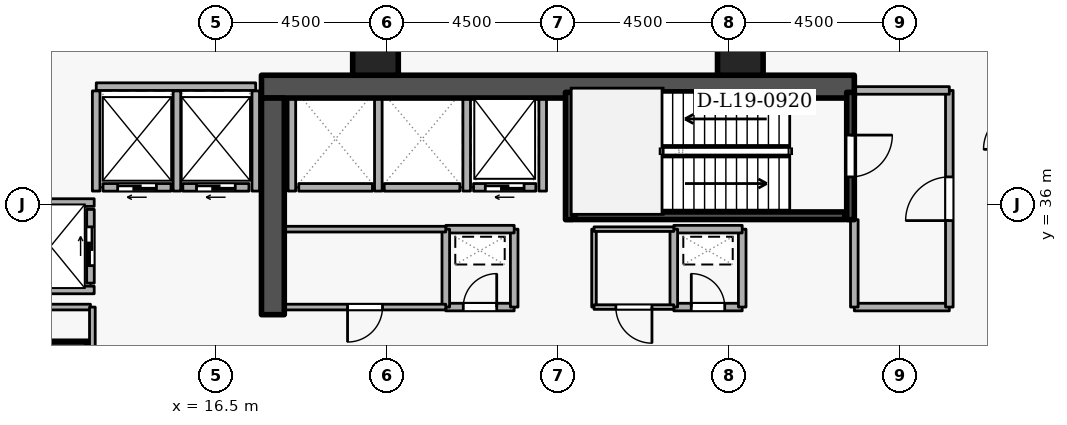
"""IFC4 building model, lengths in metres.
Left out: names, types, materials, properties, quantities, classifications, styles, units other than length and angle.
Written with IfcOpenShell. Run it as: python <this file> out.ifc"""

import sys

from ifc_helpers import new_model, si_unit, direction, frame, frame_2d, origin, origin_2d, place, context, subcontext, project, spatial, rectangle, extrude, element, fill, save


model = new_model("IFC4")
c1 = context("Model", 3, precision=1e-05, world=origin(), true_north=direction((0.0, 1.0)))
c2 = subcontext(c1, "Body", "Model", "MODEL_VIEW")
j1 = project(units=[si_unit("LENGTHUNIT", "METRE"), si_unit("PLANEANGLEUNIT", "RADIAN")], contexts=[c1])
p1 = place(None, origin())
s1 = spatial("IfcSite", under=j1, at=p1, CompositionType="ELEMENT")
p2 = place(p1, origin())
s2 = spatial("IfcBuilding", under=s1, at=p2, CompositionType="ELEMENT")
p3 = place(p2, frame((0.0, 0.0, 75.9)))
s3 = spatial("IfcBuildingStorey", under=s2, at=p3, CompositionType="ELEMENT", Elevation=75.9)
p4 = place(p3, frame((17.7, 39.1, 0.0), z_axis=(0.0, 0.0, 1.0), x_axis=(1.0, 0.0, 0.0)))
e1 = element("IfcWall", 1, at=p4, inside=s3, PredefinedType="SHEAR", context=c2, shape_type="SweptSolid", body=[
    extrude(rectangle(XDim=15.6, YDim=0.6, at=frame_2d((7.8, 0.0))), origin(), (0.0, 0.0, 1.0), 4.2),
])
p5 = place(p3, frame((18.0, 33.1, 0.0), z_axis=(0.0, 0.0, 1.0), x_axis=(0.0, 1.0, 0.0)))
e2 = element("IfcWall", 2, at=p5, inside=s3, PredefinedType="SHEAR", context=c2, shape_type="SweptSolid", body=[
    extrude(rectangle(XDim=5.7, YDim=0.6, at=frame_2d((2.85, 0.0))), origin(), (0.0, 0.0, 1.0), 4.2),
])
for number, where, z_axis, x_axis in (
    (3, (12.5, 31.8, 0.0), (0.0, 0.0, 1.0), (1.0, 0.0, 0.0)),
    (4, (20.7, 40.0, 0.0), (0.0, 0.0, 1.0), (1.0, 0.0, 0.0)),
    (5, (30.3, 40.0, 0.0), (0.0, 0.0, 1.0), (1.0, 0.0, 0.0)),
):
    element("IfcColumn", number, at=place(p3, frame(where, z_axis=z_axis, x_axis=x_axis)), inside=s3, PredefinedType="COLUMN", context=c2, shape_type="SweptSolid", body=[
        extrude(rectangle(XDim=1.2, YDim=1.2, at=origin_2d()), origin(), (0.0, 0.0, 1.0), 4.2),
    ])
p6 = place(p3, frame((24.92, 36.45, 0.0), z_axis=(0.0, 0.0, 1.0), x_axis=(-1.0, 0.0, 0.0)))
e6 = element("IfcWall", 6, at=p6, inside=s3, PredefinedType="STANDARD", context=c2, shape_type="SweptSolid", body=[
    extrude(rectangle(XDim=1.64, YDim=0.2, at=frame_2d((0.82, 0.0))), origin(), (0.0, 0.0, 1.0), 3.94),
])
p7 = place(p6, frame((0.31, 0.0, 0.0)))
e7 = element("IfcOpeningElement", 7, at=p7, cuts=e6, PredefinedType="OPENING", context=c2, shape_type="SweptSolid", body=[
    extrude(rectangle(XDim=1.02, YDim=2.06, at=frame_2d((0.51, 1.03))), frame((0.0, 0.11, 0.0), z_axis=(0.0, -1.0, 0.0), x_axis=(1.0, 0.0, 0.0)), (0.0, 0.0, 1.0), 0.22),
])
p8 = place(p3, frame((22.92, 36.45, 0.0), z_axis=(0.0, 0.0, 1.0), x_axis=(-1.0, 0.0, 0.0)))
e8 = element("IfcWall", 8, at=p8, inside=s3, PredefinedType="STANDARD", context=c2, shape_type="SweptSolid", body=[
    extrude(rectangle(XDim=1.99, YDim=0.2, at=frame_2d((0.995, 0.0))), origin(), (0.0, 0.0, 1.0), 3.94),
])
p9 = place(p3, frame((20.62, 36.45, 0.0), z_axis=(0.0, 0.0, 1.0), x_axis=(-1.0, 0.0, 0.0)))
e9 = element("IfcWall", 9, at=p9, inside=s3, PredefinedType="STANDARD", context=c2, shape_type="SweptSolid", body=[
    extrude(rectangle(XDim=1.94, YDim=0.2, at=frame_2d((0.97, 0.0))), origin(), (0.0, 0.0, 1.0), 3.94),
])
p10 = place(p3, frame((17.37, 36.45, 0.0), z_axis=(0.0, 0.0, 1.0), x_axis=(-1.0, 0.0, 0.0)))
e10 = element("IfcWall", 10, at=p10, inside=s3, PredefinedType="STANDARD", context=c2, shape_type="SweptSolid", body=[
    extrude(rectangle(XDim=1.74, YDim=0.2, at=frame_2d((0.87, 0.0))), origin(), (0.0, 0.0, 1.0), 3.94),
])
p11 = place(p10, frame((0.36, 0.0, 0.0)))
e11 = element("IfcOpeningElement", 11, at=p11, cuts=e10, PredefinedType="OPENING", context=c2, shape_type="SweptSolid", body=[
    extrude(rectangle(XDim=1.02, YDim=2.06, at=frame_2d((0.51, 1.03))), frame((0.0, 0.11, 0.0), z_axis=(0.0, -1.0, 0.0), x_axis=(1.0, 0.0, 0.0)), (0.0, 0.0, 1.0), 0.22),
])
p12 = place(p3, frame((15.32, 36.45, 0.0), z_axis=(0.0, 0.0, 1.0), x_axis=(-1.0, 0.0, 0.0)))
e12 = element("IfcWall", 12, at=p12, inside=s3, PredefinedType="STANDARD", context=c2, shape_type="SweptSolid", body=[
    extrude(rectangle(XDim=1.79, YDim=0.2, at=frame_2d((0.895, 0.0))), origin(), (0.0, 0.0, 1.0), 3.94),
])
p13 = place(p12, frame((0.385, 0.0, 0.0)))
e13 = element("IfcOpeningElement", 13, at=p13, cuts=e12, PredefinedType="OPENING", context=c2, shape_type="SweptSolid", body=[
    extrude(rectangle(XDim=1.02, YDim=2.06, at=frame_2d((0.51, 1.03))), frame((0.0, 0.11, 0.0), z_axis=(0.0, -1.0, 0.0), x_axis=(1.0, 0.0, 0.0)), (0.0, 0.0, 1.0), 0.22),
])
p14 = place(p3, frame((13.2, 33.93, 0.0), z_axis=(0.0, 0.0, 1.0), x_axis=(0.0, 1.0, 0.0)))
e14 = element("IfcWall", 14, at=p14, inside=s3, PredefinedType="STANDARD", context=c2, shape_type="SweptSolid", body=[
    extrude(rectangle(XDim=1.94, YDim=0.2, at=frame_2d((0.97, 0.0))), origin(), (0.0, 0.0, 1.0), 3.94),
])
p15 = place(p14, frame((0.46, 0.0, 0.0)))
e15 = element("IfcOpeningElement", 15, at=p15, cuts=e14, PredefinedType="OPENING", context=c2, shape_type="SweptSolid", body=[
    extrude(rectangle(XDim=1.02, YDim=2.06, at=frame_2d((0.51, 1.03))), frame((0.0, 0.11, 0.0), z_axis=(0.0, -1.0, 0.0), x_axis=(1.0, 0.0, 0.0)), (0.0, 0.0, 1.0), 0.22),
])
for number, where, z_axis, x_axis in (
    (16, (25.1, 36.352, 0.0), (0.0, 0.0, 1.0), (0.0, 1.0, 0.0)),
    (17, (23.1, 36.352, 0.0), (0.0, 0.0, 1.0), (0.0, 1.0, 0.0)),
    (18, (20.775, 36.352, 0.0), (0.0, 0.0, 1.0), (0.0, 1.0, 0.0)),
    (19, (18.5, 36.352, 0.0), (0.0, 0.0, 1.0), (0.0, 1.0, 0.0)),
):
    element("IfcWall", number, at=place(p3, frame(where, z_axis=z_axis, x_axis=x_axis)), inside=s3, PredefinedType="STANDARD", context=c2, shape_type="SweptSolid", body=[
        extrude(rectangle(XDim=2.436, YDim=0.2, at=frame_2d((1.218, 0.0))), origin(), (0.0, 0.0, 1.0), 3.94),
    ])
p16 = place(p3, frame((13.352, 39.1, 0.0), z_axis=(0.0, 0.0, 1.0), x_axis=(1.0, 0.0, 0.0)))
e20 = element("IfcWall", 20, at=p16, inside=s3, PredefinedType="STANDARD", context=c2, shape_type="SweptSolid", body=[
    extrude(rectangle(XDim=4.196, YDim=0.2, at=frame_2d((2.098, 0.0))), origin(), (0.0, 0.0, 1.0), 3.94),
])
p17 = place(p3, frame((17.55, 36.352, 0.0), z_axis=(0.0, 0.0, 1.0), x_axis=(0.0, 1.0, 0.0)))
e21 = element("IfcWall", 21, at=p17, inside=s3, PredefinedType="STANDARD", context=c2, shape_type="SweptSolid", body=[
    extrude(rectangle(XDim=2.636, YDim=0.2, at=frame_2d((1.318, 0.0))), origin(), (0.0, 0.0, 1.0), 3.145),
])
for number, where, z_axis, x_axis in (
    (22, (15.475, 36.352, 0.0), (0.0, 0.0, 1.0), (0.0, 1.0, 0.0)),
    (23, (13.35, 36.352, 0.0), (0.0, 0.0, 1.0), (0.0, 1.0, 0.0)),
):
    element("IfcWall", number, at=place(p3, frame(where, z_axis=z_axis, x_axis=x_axis)), inside=s3, PredefinedType="STANDARD", context=c2, shape_type="SweptSolid", body=[
        extrude(rectangle(XDim=2.636, YDim=0.2, at=frame_2d((1.318, 0.0))), origin(), (0.0, 0.0, 1.0), 3.94),
    ])
for number, where, z_axis, x_axis in (
    (24, (11.002, 36.05, 0.0), (0.0, 0.0, 1.0), (1.0, 0.0, 0.0)),
    (25, (11.002, 33.75, 0.0), (0.0, 0.0, 1.0), (1.0, 0.0, 0.0)),
):
    element("IfcWall", number, at=place(p3, frame(where, z_axis=z_axis, x_axis=x_axis)), inside=s3, PredefinedType="STANDARD", context=c2, shape_type="SweptSolid", body=[
        extrude(rectangle(XDim=2.296, YDim=0.2, at=frame_2d((1.148, 0.0))), origin(), (0.0, 0.0, 1.0), 3.94),
    ])
p18 = place(p3, frame((33.2, 38.95, 0.0), z_axis=(0.0, 0.0, 1.0), x_axis=(0.0, -1.0, 0.0)))
e26 = element("IfcWall", 26, at=p18, inside=s3, PredefinedType="SHEAR", context=c2, shape_type="SweptSolid", body=[
    extrude(rectangle(XDim=3.35, YDim=0.2, at=frame_2d((1.675, 0.0))), origin(), (0.0, 0.0, 1.0), 4.2),
])
p19 = place(p18, frame((1.125, 0.0, 0.0)))
e27 = element("IfcOpeningElement", 27, at=p19, cuts=e26, PredefinedType="OPENING", context=c2, shape_type="SweptSolid", body=[
    extrude(rectangle(XDim=1.1, YDim=2.1, at=frame_2d((0.55, 1.05))), frame((0.0, 0.11, 0.0), z_axis=(0.0, -1.0, 0.0), x_axis=(1.0, 0.0, 0.0)), (0.0, 0.0, 1.0), 0.22),
])
p20 = place(p3, frame((25.8, 35.6, 0.0), z_axis=(0.0, 0.0, 1.0), x_axis=(0.0, 1.0, 0.0)))
e28 = element("IfcWall", 28, at=p20, inside=s3, PredefinedType="SHEAR", context=c2, shape_type="SweptSolid", body=[
    extrude(rectangle(XDim=3.35, YDim=0.2, at=frame_2d((1.675, 0.0))), origin(), (0.0, 0.0, 1.0), 4.2),
])
p21 = place(p3, frame((25.95, 35.703, 0.0), z_axis=(0.0, 0.0, 1.0), x_axis=(1.0, 0.0, 0.0)))
e29 = element("IfcWall", 29, at=p21, inside=s3, PredefinedType="SHEAR", context=c2, shape_type="SweptSolid", body=[
    extrude(rectangle(XDim=7.1, YDim=0.2, at=frame_2d((3.55, 0.0))), origin(), (0.0, 0.0, 1.0), 4.2),
])
p22 = place(p3, frame((33.3, 33.3, 0.0), z_axis=(0.0, 0.0, 1.0), x_axis=(1.0, 0.0, 0.0)))
e30 = element("IfcWall", 30, at=p22, inside=s3, PredefinedType="STANDARD", context=c2, shape_type="SweptSolid", body=[
    extrude(rectangle(XDim=2.5, YDim=0.2, at=frame_2d((1.25, 0.0))), origin(), (0.0, 0.0, 1.0), 3.94),
])
p23 = place(p3, frame((35.8, 33.3, 0.0), z_axis=(0.0, 0.0, 1.0), x_axis=(0.0, 1.0, 0.0)))
e31 = element("IfcWall", 31, at=p23, inside=s3, PredefinedType="STANDARD", context=c2, shape_type="SweptSolid", body=[
    extrude(rectangle(XDim=5.7, YDim=0.2, at=frame_2d((2.85, 0.0))), origin(), (0.0, 0.0, 1.0), 3.94),
])
p24 = place(p23, frame((2.275, 0.0, 0.0)))
e32 = element("IfcOpeningElement", 32, at=p24, cuts=e31, PredefinedType="OPENING", context=c2, shape_type="SweptSolid", body=[
    extrude(rectangle(XDim=1.15, YDim=2.1, at=frame_2d((0.575, 1.05))), frame((0.0, 0.11, 0.0), z_axis=(0.0, -1.0, 0.0), x_axis=(1.0, 0.0, 0.0)), (0.0, 0.0, 1.0), 0.22),
])
p25 = place(p3, frame((35.8, 39.0, 0.0), z_axis=(0.0, 0.0, 1.0), x_axis=(-1.0, 0.0, 0.0)))
e33 = element("IfcWall", 33, at=p25, inside=s3, PredefinedType="STANDARD", context=c2, shape_type="SweptSolid", body=[
    extrude(rectangle(XDim=2.5, YDim=0.2, at=frame_2d((1.25, 0.0))), origin(), (0.0, 0.0, 1.0), 3.94),
])
p26 = place(p3, frame((33.3, 35.6, 0.0), z_axis=(0.0, 0.0, 1.0), x_axis=(0.0, -1.0, 0.0)))
e34 = element("IfcWall", 34, at=p26, inside=s3, PredefinedType="STANDARD", context=c2, shape_type="SweptSolid", body=[
    extrude(rectangle(XDim=2.3, YDim=0.2, at=frame_2d((1.15, 0.0))), origin(), (0.0, 0.0, 1.0), 3.145),
])
p27 = place(p3, frame((22.55, 33.3, 0.0), z_axis=(0.0, 0.0, 1.0), x_axis=(1.0, 0.0, 0.0)))
e35 = element("IfcWall", 35, at=p27, inside=s3, PredefinedType="STANDARD", context=c2, shape_type="SweptSolid", body=[
    extrude(rectangle(XDim=1.8, YDim=0.2, at=frame_2d((0.9, 0.0))), origin(), (0.0, 0.0, 1.0), 3.94),
])
p28 = place(p27, frame((0.46, 0.0, 0.0)))
e36 = element("IfcOpeningElement", 36, at=p28, cuts=e35, PredefinedType="OPENING", context=c2, shape_type="SweptSolid", body=[
    extrude(rectangle(XDim=0.88, YDim=2.04, at=frame_2d((0.44, 1.02))), frame((0.0, 0.11, 0.0), z_axis=(0.0, -1.0, 0.0), x_axis=(1.0, 0.0, 0.0)), (0.0, 0.0, 1.0), 0.22),
])
p29 = place(p3, frame((24.35, 33.3, 0.0), z_axis=(0.0, 0.0, 1.0), x_axis=(0.0, 1.0, 0.0)))
e37 = element("IfcWall", 37, at=p29, inside=s3, PredefinedType="STANDARD", context=c2, shape_type="SweptSolid", body=[
    extrude(rectangle(XDim=2.05, YDim=0.2, at=frame_2d((1.025, 0.0))), origin(), (0.0, 0.0, 1.0), 3.94),
])
p30 = place(p3, frame((24.35, 35.35, 0.0), z_axis=(0.0, 0.0, 1.0), x_axis=(-1.0, 0.0, 0.0)))
e38 = element("IfcWall", 38, at=p30, inside=s3, PredefinedType="STANDARD", context=c2, shape_type="SweptSolid", body=[
    extrude(rectangle(XDim=1.8, YDim=0.2, at=frame_2d((0.9, 0.0))), origin(), (0.0, 0.0, 1.0), 3.94),
])
p31 = place(p3, frame((22.55, 35.35, 0.0), z_axis=(0.0, 0.0, 1.0), x_axis=(0.0, -1.0, 0.0)))
e39 = element("IfcWall", 39, at=p31, inside=s3, PredefinedType="STANDARD", context=c2, shape_type="SweptSolid", body=[
    extrude(rectangle(XDim=2.05, YDim=0.2, at=frame_2d((1.025, 0.0))), origin(), (0.0, 0.0, 1.0), 3.94),
])
p32 = place(p3, frame((28.55, 33.3, 0.0), z_axis=(0.0, 0.0, 1.0), x_axis=(1.0, 0.0, 0.0)))
e40 = element("IfcWall", 40, at=p32, inside=s3, PredefinedType="STANDARD", context=c2, shape_type="SweptSolid", body=[
    extrude(rectangle(XDim=1.8, YDim=0.2, at=frame_2d((0.9, 0.0))), origin(), (0.0, 0.0, 1.0), 3.94),
])
p33 = place(p32, frame((0.46, 0.0, 0.0)))
e41 = element("IfcOpeningElement", 41, at=p33, cuts=e40, PredefinedType="OPENING", context=c2, shape_type="SweptSolid", body=[
    extrude(rectangle(XDim=0.88, YDim=2.04, at=frame_2d((0.44, 1.02))), frame((0.0, 0.11, 0.0), z_axis=(0.0, -1.0, 0.0), x_axis=(1.0, 0.0, 0.0)), (0.0, 0.0, 1.0), 0.22),
])
p34 = place(p3, frame((30.35, 33.3, 0.0), z_axis=(0.0, 0.0, 1.0), x_axis=(0.0, 1.0, 0.0)))
e42 = element("IfcWall", 42, at=p34, inside=s3, PredefinedType="STANDARD", context=c2, shape_type="SweptSolid", body=[
    extrude(rectangle(XDim=2.05, YDim=0.2, at=frame_2d((1.025, 0.0))), origin(), (0.0, 0.0, 1.0), 3.94),
])
p35 = place(p3, frame((30.35, 35.35, 0.0), z_axis=(0.0, 0.0, 1.0), x_axis=(-1.0, 0.0, 0.0)))
e43 = element("IfcWall", 43, at=p35, inside=s3, PredefinedType="STANDARD", context=c2, shape_type="SweptSolid", body=[
    extrude(rectangle(XDim=1.8, YDim=0.2, at=frame_2d((0.9, 0.0))), origin(), (0.0, 0.0, 1.0), 3.94),
])
p36 = place(p3, frame((28.55, 35.35, 0.0), z_axis=(0.0, 0.0, 1.0), x_axis=(0.0, -1.0, 0.0)))
e44 = element("IfcWall", 44, at=p36, inside=s3, PredefinedType="STANDARD", context=c2, shape_type="SweptSolid", body=[
    extrude(rectangle(XDim=2.05, YDim=0.2, at=frame_2d((1.025, 0.0))), origin(), (0.0, 0.0, 1.0), 3.94),
])
p37 = place(p3, frame((18.3, 35.35, 0.0), z_axis=(0.0, 0.0, 1.0), x_axis=(1.0, 0.0, 0.0)))
e45 = element("IfcWall", 45, at=p37, inside=s3, PredefinedType="PARTITIONING", context=c2, shape_type="SweptSolid", body=[
    extrude(rectangle(XDim=4.25, YDim=0.15, at=frame_2d((2.125, 0.0))), origin(), (0.0, 0.0, 1.0), 3.94),
])
p38 = place(p3, frame((22.55, 33.3, 0.0), z_axis=(0.0, 0.0, 1.0), x_axis=(-1.0, 0.0, 0.0)))
e46 = element("IfcWall", 46, at=p38, inside=s3, PredefinedType="PARTITIONING", context=c2, shape_type="SweptSolid", body=[
    extrude(rectangle(XDim=4.25, YDim=0.15, at=frame_2d((2.125, 0.0))), origin(), (0.0, 0.0, 1.0), 3.94),
])
p39 = place(p38, frame((1.665, 0.0, 0.0)))
e47 = element("IfcOpeningElement", 47, at=p39, cuts=e46, PredefinedType="OPENING", context=c2, shape_type="SweptSolid", body=[
    extrude(rectangle(XDim=0.92, YDim=2.08, at=frame_2d((0.46, 1.04))), frame((0.0, 0.085, 0.0), z_axis=(0.0, -1.0, 0.0), x_axis=(1.0, 0.0, 0.0)), (0.0, 0.0, 1.0), 0.17),
])
p40 = place(p3, frame((26.45, 33.3, 0.0), z_axis=(0.0, 0.0, 1.0), x_axis=(0.0, 1.0, 0.0)))
e48 = element("IfcWall", 48, at=p40, inside=s3, PredefinedType="PARTITIONING", context=c2, shape_type="SweptSolid", body=[
    extrude(rectangle(XDim=2.05, YDim=0.12, at=frame_2d((1.025, 0.0))), origin(), (0.0, 0.0, 1.0), 3.94),
])
p41 = place(p3, frame((26.45, 35.35, 0.0), z_axis=(0.0, 0.0, 1.0), x_axis=(1.0, 0.0, 0.0)))
e49 = element("IfcWall", 49, at=p41, inside=s3, PredefinedType="PARTITIONING", context=c2, shape_type="SweptSolid", body=[
    extrude(rectangle(XDim=2.1, YDim=0.12, at=frame_2d((1.05, 0.0))), origin(), (0.0, 0.0, 1.0), 3.94),
])
p42 = place(p3, frame((28.55, 33.3, 0.0), z_axis=(0.0, 0.0, 1.0), x_axis=(-1.0, 0.0, 0.0)))
e50 = element("IfcWall", 50, at=p42, inside=s3, PredefinedType="PARTITIONING", context=c2, shape_type="SweptSolid", body=[
    extrude(rectangle(XDim=2.1, YDim=0.12, at=frame_2d((1.05, 0.0))), origin(), (0.0, 0.0, 1.0), 3.94),
])
p43 = place(p42, frame((0.575, 0.0, 0.0)))
e51 = element("IfcOpeningElement", 51, at=p43, cuts=e50, PredefinedType="OPENING", context=c2, shape_type="SweptSolid", body=[
    extrude(rectangle(XDim=0.95, YDim=2.1, at=frame_2d((0.475, 1.05))), frame((0.0, 0.07, 0.0), z_axis=(0.0, -1.0, 0.0), x_axis=(1.0, 0.0, 0.0)), (0.0, 0.0, 1.0), 0.14),
])
p44 = place(p3, frame((10.9, 33.3, 0.0), z_axis=(0.0, 0.0, 1.0), x_axis=(1.0, 0.0, 0.0)))
e52 = element("IfcWall", 52, at=p44, inside=s3, PredefinedType="PARTITIONING", context=c2, shape_type="SweptSolid", body=[
    extrude(rectangle(XDim=2.3, YDim=0.15, at=frame_2d((1.15, 0.0))), origin(), (0.0, 0.0, 1.0), 3.94),
])
p45 = place(p3, frame((13.25, 33.3, 0.0), z_axis=(0.0, 0.0, 1.0), x_axis=(0.0, -1.0, 0.0)))
e53 = element("IfcWall", 53, at=p45, inside=s3, PredefinedType="PARTITIONING", context=c2, shape_type="SweptSolid", body=[
    extrude(rectangle(XDim=1.85, YDim=0.15, at=frame_2d((0.925, 0.0))), origin(), (0.0, 0.0, 1.0), 3.94),
])
p46 = place(p7, origin())
e54 = element("IfcDoor", 54, at=p46, inside=s3, OperationType="SLIDING_TO_LEFT", PredefinedType="DOOR", context=c2, shape_type="SweptSolid", body=[
    extrude(rectangle(XDim=1.02, YDim=2.06, at=frame_2d((0.51, 1.03))), frame((0.0, 0.025, 0.0), z_axis=(0.0, -1.0, 0.0), x_axis=(1.0, 0.0, 0.0)), (0.0, 0.0, 1.0), 0.05),
])
fill(e7, e54)
p47 = place(p11, origin())
e55 = element("IfcDoor", 55, at=p47, inside=s3, OperationType="SLIDING_TO_LEFT", PredefinedType="DOOR", context=c2, shape_type="SweptSolid", body=[
    extrude(rectangle(XDim=1.02, YDim=2.06, at=frame_2d((0.51, 1.03))), frame((0.0, 0.025, 0.0), z_axis=(0.0, -1.0, 0.0), x_axis=(1.0, 0.0, 0.0)), (0.0, 0.0, 1.0), 0.05),
])
fill(e11, e55)
p48 = place(p13, origin())
e56 = element("IfcDoor", 56, at=p48, inside=s3, OperationType="SLIDING_TO_LEFT", PredefinedType="DOOR", context=c2, shape_type="SweptSolid", body=[
    extrude(rectangle(XDim=1.02, YDim=2.06, at=frame_2d((0.51, 1.03))), frame((0.0, 0.025, 0.0), z_axis=(0.0, -1.0, 0.0), x_axis=(1.0, 0.0, 0.0)), (0.0, 0.0, 1.0), 0.05),
])
fill(e13, e56)
p49 = place(p15, origin())
e57 = element("IfcDoor", 57, at=p49, inside=s3, OperationType="SLIDING_TO_LEFT", PredefinedType="DOOR", context=c2, shape_type="SweptSolid", body=[
    extrude(rectangle(XDim=1.02, YDim=2.06, at=frame_2d((0.51, 1.03))), frame((0.0, 0.025, 0.0), z_axis=(0.0, -1.0, 0.0), x_axis=(1.0, 0.0, 0.0)), (0.0, 0.0, 1.0), 0.05),
])
fill(e15, e57)
p50 = place(p19, origin())
e58 = element("IfcDoor", 58, at=p50, inside=s3, OperationType="SINGLE_SWING_LEFT", PredefinedType="DOOR", context=c2, shape_type="SweptSolid", body=[
    extrude(rectangle(XDim=1.1, YDim=2.1, at=frame_2d((0.55, 1.05))), frame((0.0, 0.025, 0.0), z_axis=(0.0, -1.0, 0.0), x_axis=(1.0, 0.0, 0.0)), (0.0, 0.0, 1.0), 0.05),
])
fill(e27, e58)
p51 = place(p24, origin())
e59 = element("IfcDoor", 59, at=p51, inside=s3, OperationType="SINGLE_SWING_LEFT", PredefinedType="DOOR", context=c2, shape_type="SweptSolid", body=[
    extrude(rectangle(XDim=1.15, YDim=2.1, at=frame_2d((0.575, 1.05))), frame((0.0, 0.025, 0.0), z_axis=(0.0, -1.0, 0.0), x_axis=(1.0, 0.0, 0.0)), (0.0, 0.0, 1.0), 0.05),
])
fill(e32, e59)
p52 = place(p28, origin())
e60 = element("IfcDoor", 60, at=p52, inside=s3, OperationType="SINGLE_SWING_RIGHT", PredefinedType="DOOR", context=c2, shape_type="SweptSolid", body=[
    extrude(rectangle(XDim=0.88, YDim=2.04, at=frame_2d((0.44, 1.02))), frame((0.0, 0.025, 0.0), z_axis=(0.0, -1.0, 0.0), x_axis=(1.0, 0.0, 0.0)), (0.0, 0.0, 1.0), 0.05),
])
fill(e36, e60)
p53 = place(p33, origin())
e61 = element("IfcDoor", 61, at=p53, inside=s3, OperationType="SINGLE_SWING_LEFT", PredefinedType="DOOR", context=c2, shape_type="SweptSolid", body=[
    extrude(rectangle(XDim=0.88, YDim=2.04, at=frame_2d((0.44, 1.02))), frame((0.0, 0.025, 0.0), z_axis=(0.0, -1.0, 0.0), x_axis=(1.0, 0.0, 0.0)), (0.0, 0.0, 1.0), 0.05),
])
fill(e41, e61)
p54 = place(p39, origin())
e62 = element("IfcDoor", 62, at=p54, inside=s3, OperationType="SINGLE_SWING_RIGHT", PredefinedType="DOOR", context=c2, shape_type="SweptSolid", body=[
    extrude(rectangle(XDim=0.92, YDim=2.08, at=frame_2d((0.46, 1.04))), frame((0.0, 0.025, 0.0), z_axis=(0.0, -1.0, 0.0), x_axis=(1.0, 0.0, 0.0)), (0.0, 0.0, 1.0), 0.05),
])
fill(e47, e62)
p55 = place(p43, origin())
e63 = element("IfcDoor", 63, at=p55, inside=s3, OperationType="SINGLE_SWING_LEFT", PredefinedType="DOOR", context=c2, shape_type="SweptSolid", body=[
    extrude(rectangle(XDim=0.95, YDim=2.1, at=frame_2d((0.475, 1.05))), frame((0.0, 0.025, 0.0), z_axis=(0.0, -1.0, 0.0), x_axis=(1.0, 0.0, 0.0)), (0.0, 0.0, 1.0), 0.05),
])
fill(e51, e63)
save(model, sys.argv[1])
